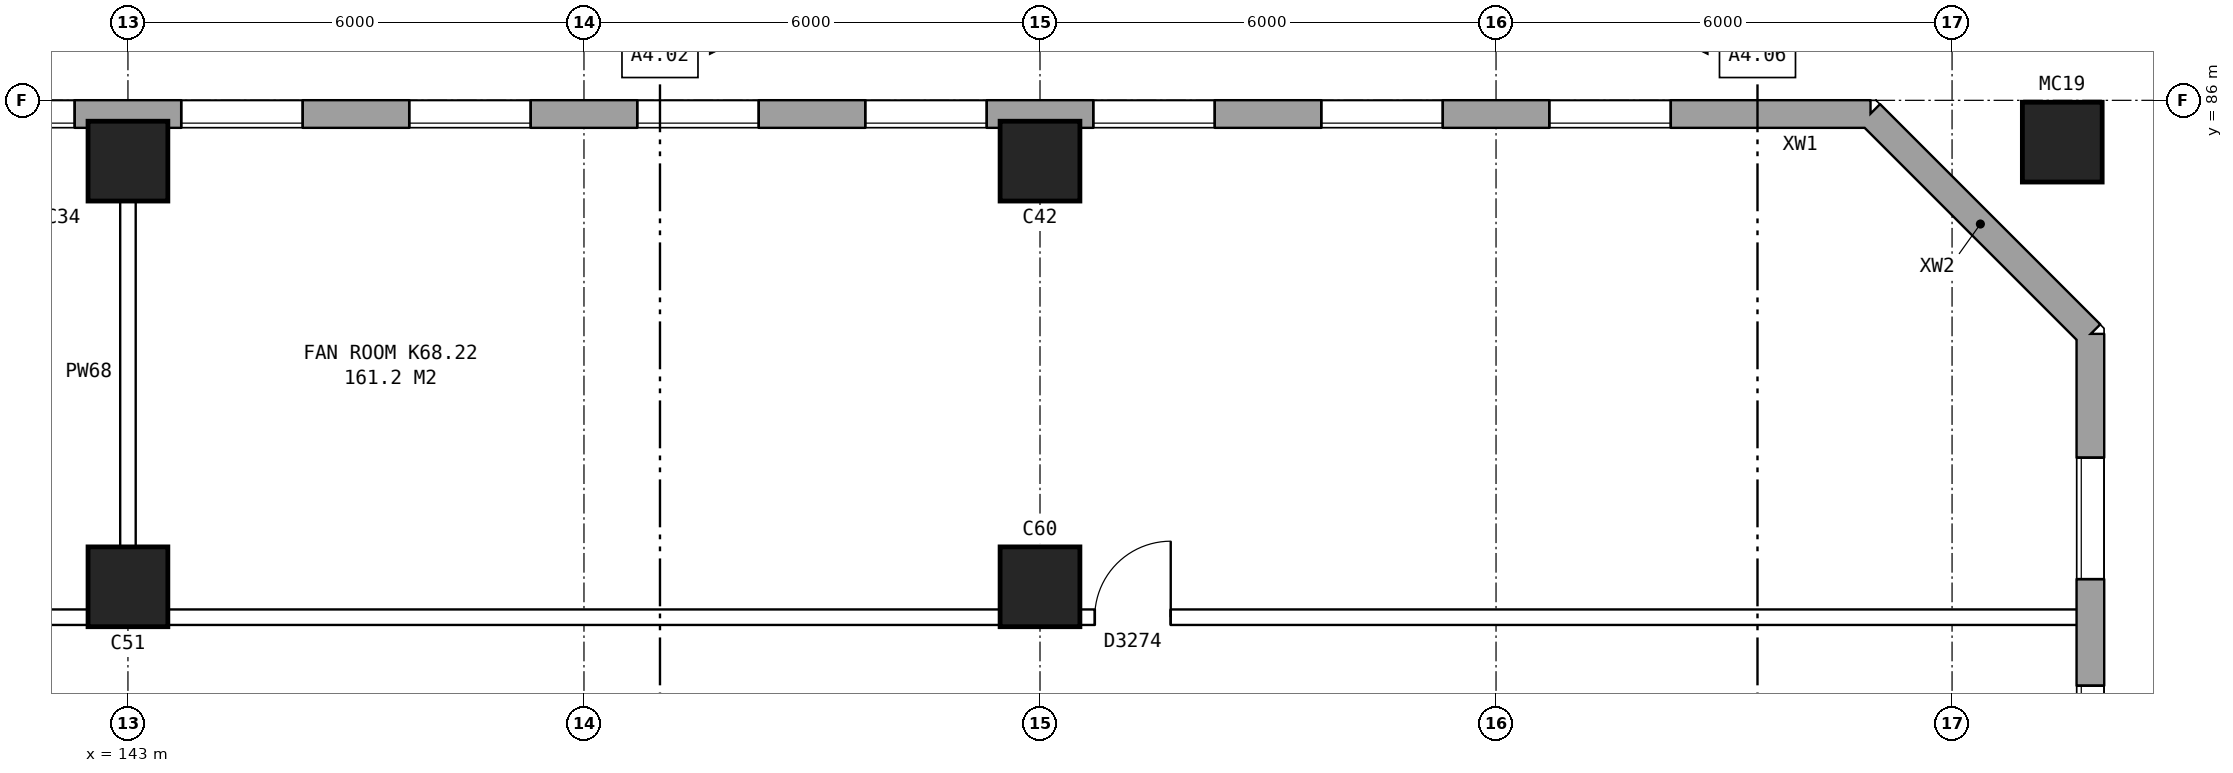
"""IFC4 building model, lengths in metres.
Left out: names, types, materials, properties, quantities, classifications, styles, units other than length and angle.
Written with IfcOpenShell. Run it as: python <this file> out.ifc"""

import sys

from ifc_helpers import new_model, si_unit, direction, frame, frame_2d, origin, origin_2d, place, context, subcontext, project, spatial, polyline, rectangle, hollow_rectangle, outline, extrude, element, fill, save


model = new_model("IFC4")
c1 = context("Model", 3, precision=1e-05, world=origin(), true_north=direction((0.0, 1.0)))
c2 = subcontext(c1, "Body", "Model", "MODEL_VIEW")
j1 = project(units=[si_unit("LENGTHUNIT", "METRE"), si_unit("PLANEANGLEUNIT", "RADIAN")], contexts=[c1])
p1 = place(None, origin())
s1 = spatial("IfcSite", under=j1, at=p1, CompositionType="ELEMENT")
p2 = place(p1, origin())
s2 = spatial("IfcBuilding", under=s1, at=p2, CompositionType="ELEMENT")
p3 = place(p2, frame((0.0, 0.0, 243.9)))
s3 = spatial("IfcBuildingStorey", under=s2, at=p3, CompositionType="ELEMENT", Elevation=243.9)
p4 = place(p3, frame((143.0, 79.6, 0.0), z_axis=(0.0, 0.0, 1.0), x_axis=(1.0, 0.0, 0.0)))
e1 = element("IfcColumn", 1, at=p4, inside=s3, PredefinedType="COLUMN", context=c2, shape_type="SweptSolid", body=[
    extrude(rectangle(XDim=1.05, YDim=1.05, at=origin_2d()), origin(), (0.0, 0.0, 1.0), 15.563),
])
p5 = place(p3, frame((143.0, 85.2, 0.0), z_axis=(0.0, 0.0, 1.0), x_axis=(1.0, 0.0, 0.0)))
e2 = element("IfcColumn", 2, at=p5, inside=s3, PredefinedType="COLUMN", context=c2, shape_type="SweptSolid", body=[
    extrude(rectangle(XDim=1.05, YDim=1.05, at=origin_2d()), origin(), (0.0, 0.0, 1.0), 18.363),
])
p6 = place(p3, frame((155.0, 79.6, 0.0), z_axis=(0.0, 0.0, 1.0), x_axis=(1.0, 0.0, 0.0)))
e3 = element("IfcColumn", 3, at=p6, inside=s3, PredefinedType="COLUMN", context=c2, shape_type="SweptSolid", body=[
    extrude(rectangle(XDim=1.05, YDim=1.05, at=origin_2d()), origin(), (0.0, 0.0, 1.0), 15.563),
])
p7 = place(p3, frame((155.0, 85.2, 0.0), z_axis=(0.0, 0.0, 1.0), x_axis=(1.0, 0.0, 0.0)))
e4 = element("IfcColumn", 4, at=p7, inside=s3, PredefinedType="COLUMN", context=c2, shape_type="SweptSolid", body=[
    extrude(rectangle(XDim=1.05, YDim=1.05, at=origin_2d()), origin(), (0.0, 0.0, 1.0), 18.363),
])
p8 = place(p3, frame((168.45, 85.45, 0.0), z_axis=(0.0, 0.0, 1.0), x_axis=(1.0, 0.0, 0.0)))
e5 = element("IfcColumn", 5, at=p8, inside=s3, PredefinedType="COLUMN", context=c2, shape_type="SweptSolid", body=[
    extrude(hollow_rectangle(XDim=1.05, YDim=1.05, WallThickness=0.053, at=origin_2d()), origin(), (0.0, 0.0, 1.0), 18.488),
])
p9 = place(p3, frame((168.82, 57.075, 0.0), z_axis=(0.0, 0.0, 1.0), x_axis=(0.0, 1.0, 0.0)))
e6 = element("IfcWall", 6, at=p9, inside=s3, PredefinedType="STANDARD", context=c2, shape_type="SweptSolid", body=[
    extrude(outline(polyline([(0.0, 0.0), (25.851, 0.0), (25.851, 17.763), (0.0, 4.837), (0.0, 0.0)])), frame((0.0, 0.18, 0.0), z_axis=(0.0, -1.0, 0.0), x_axis=(1.0, 0.0, 0.0)), (0.0, 0.0, 1.0), 0.36),
])
p10 = place(p9, frame((1.625, 0.0, 1.5)))
e7 = element("IfcOpeningElement", 7, at=p10, cuts=e6, PredefinedType="OPENING", context=c2, shape_type="SweptSolid", body=[
    extrude(rectangle(XDim=1.6, YDim=1.2, at=frame_2d((0.8, 0.6))), frame((0.0, 0.19, 0.0), z_axis=(0.0, -1.0, 0.0), x_axis=(1.0, 0.0, 0.0)), (0.0, 0.0, 1.0), 0.38),
])
p11 = place(p9, frame((4.625, 0.0, 1.5)))
e8 = element("IfcOpeningElement", 8, at=p11, cuts=e6, PredefinedType="OPENING", context=c2, shape_type="SweptSolid", body=[
    extrude(rectangle(XDim=1.6, YDim=1.2, at=frame_2d((0.8, 0.6))), frame((0.0, 0.19, 0.0), z_axis=(0.0, -1.0, 0.0), x_axis=(1.0, 0.0, 0.0)), (0.0, 0.0, 1.0), 0.38),
])
p12 = place(p9, frame((19.625, 0.0, 1.5)))
e9 = element("IfcOpeningElement", 9, at=p12, cuts=e6, PredefinedType="OPENING", context=c2, shape_type="SweptSolid", body=[
    extrude(rectangle(XDim=1.6, YDim=1.2, at=frame_2d((0.8, 0.6))), frame((0.0, 0.19, 0.0), z_axis=(0.0, -1.0, 0.0), x_axis=(1.0, 0.0, 0.0)), (0.0, 0.0, 1.0), 0.38),
])
p13 = place(p9, frame((22.625, 0.0, 1.5)))
e10 = element("IfcOpeningElement", 10, at=p13, cuts=e6, PredefinedType="OPENING", context=c2, shape_type="SweptSolid", body=[
    extrude(rectangle(XDim=1.6, YDim=1.2, at=frame_2d((0.8, 0.6))), frame((0.0, 0.19, 0.0), z_axis=(0.0, -1.0, 0.0), x_axis=(1.0, 0.0, 0.0)), (0.0, 0.0, 1.0), 0.38),
])
p14 = place(p3, frame((168.82, 82.925, 0.0), z_axis=(0.0, 0.0, 1.0), x_axis=(-0.707106781187, 0.707106781187, 0.0)))
e11 = element("IfcWall", 11, at=p14, inside=s3, PredefinedType="STANDARD", context=c2, shape_type="SweptSolid", body=[
    extrude(outline(polyline([(0.0, 0.0), (4.094, 0.0), (4.094, 19.21), (0.0, 17.763), (0.0, 0.0)])), frame((0.0, 0.18, 0.0), z_axis=(0.0, -1.0, 0.0), x_axis=(1.0, 0.0, 0.0)), (0.0, 0.0, 1.0), 0.36),
])
p15 = place(p3, frame((165.925, 85.82, 0.0), z_axis=(0.0, 0.0, 1.0), x_axis=(-1.0, 0.0, 0.0)))
e12 = element("IfcWall", 12, at=p15, inside=s3, PredefinedType="STANDARD", context=c2, shape_type="SweptSolid", body=[
    extrude(rectangle(XDim=33.85, YDim=0.36, at=frame_2d((16.925, 0.0))), origin(), (0.0, 0.0, 1.0), 19.21),
])
p16 = place(p15, frame((29.625, 0.0, 1.5)))
e13 = element("IfcOpeningElement", 13, at=p16, cuts=e12, PredefinedType="OPENING", context=c2, shape_type="SweptSolid", body=[
    extrude(rectangle(XDim=1.6, YDim=1.2, at=frame_2d((0.8, 0.6))), frame((0.0, 0.19, 0.0), z_axis=(0.0, -1.0, 0.0), x_axis=(1.0, 0.0, 0.0)), (0.0, 0.0, 1.0), 0.38),
])
p17 = place(p15, frame((26.625, 0.0, 1.5)))
e14 = element("IfcOpeningElement", 14, at=p17, cuts=e12, PredefinedType="OPENING", context=c2, shape_type="SweptSolid", body=[
    extrude(rectangle(XDim=1.6, YDim=1.2, at=frame_2d((0.8, 0.6))), frame((0.0, 0.19, 0.0), z_axis=(0.0, -1.0, 0.0), x_axis=(1.0, 0.0, 0.0)), (0.0, 0.0, 1.0), 0.38),
])
p18 = place(p15, frame((23.625, 0.0, 1.5)))
e15 = element("IfcOpeningElement", 15, at=p18, cuts=e12, PredefinedType="OPENING", context=c2, shape_type="SweptSolid", body=[
    extrude(rectangle(XDim=1.6, YDim=1.2, at=frame_2d((0.8, 0.6))), frame((0.0, 0.19, 0.0), z_axis=(0.0, -1.0, 0.0), x_axis=(1.0, 0.0, 0.0)), (0.0, 0.0, 1.0), 0.38),
])
p19 = place(p15, frame((20.625, 0.0, 1.5)))
e16 = element("IfcOpeningElement", 16, at=p19, cuts=e12, PredefinedType="OPENING", context=c2, shape_type="SweptSolid", body=[
    extrude(rectangle(XDim=1.6, YDim=1.2, at=frame_2d((0.8, 0.6))), frame((0.0, 0.19, 0.0), z_axis=(0.0, -1.0, 0.0), x_axis=(1.0, 0.0, 0.0)), (0.0, 0.0, 1.0), 0.38),
])
p20 = place(p15, frame((17.625, 0.0, 1.5)))
e17 = element("IfcOpeningElement", 17, at=p20, cuts=e12, PredefinedType="OPENING", context=c2, shape_type="SweptSolid", body=[
    extrude(rectangle(XDim=1.6, YDim=1.2, at=frame_2d((0.8, 0.6))), frame((0.0, 0.19, 0.0), z_axis=(0.0, -1.0, 0.0), x_axis=(1.0, 0.0, 0.0)), (0.0, 0.0, 1.0), 0.38),
])
p21 = place(p15, frame((14.625, 0.0, 1.5)))
e18 = element("IfcOpeningElement", 18, at=p21, cuts=e12, PredefinedType="OPENING", context=c2, shape_type="SweptSolid", body=[
    extrude(rectangle(XDim=1.6, YDim=1.2, at=frame_2d((0.8, 0.6))), frame((0.0, 0.19, 0.0), z_axis=(0.0, -1.0, 0.0), x_axis=(1.0, 0.0, 0.0)), (0.0, 0.0, 1.0), 0.38),
])
p22 = place(p15, frame((11.625, 0.0, 1.5)))
e19 = element("IfcOpeningElement", 19, at=p22, cuts=e12, PredefinedType="OPENING", context=c2, shape_type="SweptSolid", body=[
    extrude(rectangle(XDim=1.6, YDim=1.2, at=frame_2d((0.8, 0.6))), frame((0.0, 0.19, 0.0), z_axis=(0.0, -1.0, 0.0), x_axis=(1.0, 0.0, 0.0)), (0.0, 0.0, 1.0), 0.38),
])
p23 = place(p15, frame((8.625, 0.0, 1.5)))
e20 = element("IfcOpeningElement", 20, at=p23, cuts=e12, PredefinedType="OPENING", context=c2, shape_type="SweptSolid", body=[
    extrude(rectangle(XDim=1.6, YDim=1.2, at=frame_2d((0.8, 0.6))), frame((0.0, 0.19, 0.0), z_axis=(0.0, -1.0, 0.0), x_axis=(1.0, 0.0, 0.0)), (0.0, 0.0, 1.0), 0.38),
])
p24 = place(p15, frame((5.625, 0.0, 1.5)))
e21 = element("IfcOpeningElement", 21, at=p24, cuts=e12, PredefinedType="OPENING", context=c2, shape_type="SweptSolid", body=[
    extrude(rectangle(XDim=1.6, YDim=1.2, at=frame_2d((0.8, 0.6))), frame((0.0, 0.19, 0.0), z_axis=(0.0, -1.0, 0.0), x_axis=(1.0, 0.0, 0.0)), (0.0, 0.0, 1.0), 0.38),
])
p25 = place(p15, frame((2.625, 0.0, 1.5)))
e22 = element("IfcOpeningElement", 22, at=p25, cuts=e12, PredefinedType="OPENING", context=c2, shape_type="SweptSolid", body=[
    extrude(rectangle(XDim=1.6, YDim=1.2, at=frame_2d((0.8, 0.6))), frame((0.0, 0.19, 0.0), z_axis=(0.0, -1.0, 0.0), x_axis=(1.0, 0.0, 0.0)), (0.0, 0.0, 1.0), 0.38),
])
p26 = place(p3, frame((32.24, 79.2, 0.0), z_axis=(0.0, 0.0, 1.0), x_axis=(1.0, 0.0, 0.0)))
e23 = element("IfcWall", 23, at=p26, inside=s3, PredefinedType="PARTITIONING", context=c2, shape_type="SweptSolid", body=[
    extrude(rectangle(XDim=136.52, YDim=0.2, at=frame_2d((68.26, 0.0))), origin(), (0.0, 0.0, 1.0), 3.3),
])
p27 = place(p26, frame((3.44, 0.0, 0.0)))
e24 = element("IfcOpeningElement", 24, at=p27, cuts=e23, PredefinedType="OPENING", context=c2, shape_type="SweptSolid", body=[
    extrude(rectangle(XDim=1.0, YDim=2.1, at=frame_2d((0.5, 1.05))), frame((0.0, 0.11, 0.0), z_axis=(0.0, -1.0, 0.0), x_axis=(1.0, 0.0, 0.0)), (0.0, 0.0, 1.0), 0.22),
])
p28 = place(p26, frame((13.26, 0.0, 0.0)))
e25 = element("IfcOpeningElement", 25, at=p28, cuts=e23, PredefinedType="OPENING", context=c2, shape_type="SweptSolid", body=[
    extrude(rectangle(XDim=1.0, YDim=2.1, at=frame_2d((0.5, 1.05))), frame((0.0, 0.11, 0.0), z_axis=(0.0, -1.0, 0.0), x_axis=(1.0, 0.0, 0.0)), (0.0, 0.0, 1.0), 0.22),
])
p29 = place(p26, frame((25.26, 0.0, 0.0)))
e26 = element("IfcOpeningElement", 26, at=p29, cuts=e23, PredefinedType="OPENING", context=c2, shape_type="SweptSolid", body=[
    extrude(rectangle(XDim=1.0, YDim=2.1, at=frame_2d((0.5, 1.05))), frame((0.0, 0.11, 0.0), z_axis=(0.0, -1.0, 0.0), x_axis=(1.0, 0.0, 0.0)), (0.0, 0.0, 1.0), 0.22),
])
p30 = place(p26, frame((37.08, 0.0, 0.0)))
e27 = element("IfcOpeningElement", 27, at=p30, cuts=e23, PredefinedType="OPENING", context=c2, shape_type="SweptSolid", body=[
    extrude(rectangle(XDim=1.0, YDim=2.1, at=frame_2d((0.5, 1.05))), frame((0.0, 0.11, 0.0), z_axis=(0.0, -1.0, 0.0), x_axis=(1.0, 0.0, 0.0)), (0.0, 0.0, 1.0), 0.22),
])
p31 = place(p26, frame((49.955, 0.0, 0.0)))
e28 = element("IfcOpeningElement", 28, at=p31, cuts=e23, PredefinedType="OPENING", context=c2, shape_type="SweptSolid", body=[
    extrude(rectangle(XDim=1.0, YDim=2.1, at=frame_2d((0.5, 1.05))), frame((0.0, 0.11, 0.0), z_axis=(0.0, -1.0, 0.0), x_axis=(1.0, 0.0, 0.0)), (0.0, 0.0, 1.0), 0.22),
])
p32 = place(p26, frame((67.322, 0.0, 0.0)))
e29 = element("IfcOpeningElement", 29, at=p32, cuts=e23, PredefinedType="OPENING", context=c2, shape_type="SweptSolid", body=[
    extrude(rectangle(XDim=1.0, YDim=2.1, at=frame_2d((0.5, 1.05))), frame((0.0, 0.11, 0.0), z_axis=(0.0, -1.0, 0.0), x_axis=(1.0, 0.0, 0.0)), (0.0, 0.0, 1.0), 0.22),
])
p33 = place(p26, frame((84.51, 0.0, 0.0)))
e30 = element("IfcOpeningElement", 30, at=p33, cuts=e23, PredefinedType="OPENING", context=c2, shape_type="SweptSolid", body=[
    extrude(rectangle(XDim=1.0, YDim=2.1, at=frame_2d((0.5, 1.05))), frame((0.0, 0.11, 0.0), z_axis=(0.0, -1.0, 0.0), x_axis=(1.0, 0.0, 0.0)), (0.0, 0.0, 1.0), 0.22),
])
p34 = place(p26, frame((95.003, 0.0, 0.0)))
e31 = element("IfcOpeningElement", 31, at=p34, cuts=e23, PredefinedType="OPENING", context=c2, shape_type="SweptSolid", body=[
    extrude(rectangle(XDim=1.0, YDim=2.1, at=frame_2d((0.5, 1.05))), frame((0.0, 0.11, 0.0), z_axis=(0.0, -1.0, 0.0), x_axis=(1.0, 0.0, 0.0)), (0.0, 0.0, 1.0), 0.22),
])
p35 = place(p26, frame((104.44, 0.0, 0.0)))
e32 = element("IfcOpeningElement", 32, at=p35, cuts=e23, PredefinedType="OPENING", context=c2, shape_type="SweptSolid", body=[
    extrude(rectangle(XDim=1.0, YDim=2.1, at=frame_2d((0.5, 1.05))), frame((0.0, 0.11, 0.0), z_axis=(0.0, -1.0, 0.0), x_axis=(1.0, 0.0, 0.0)), (0.0, 0.0, 1.0), 0.22),
])
p36 = place(p26, frame((123.48, 0.0, 0.0)))
e33 = element("IfcOpeningElement", 33, at=p36, cuts=e23, PredefinedType="OPENING", context=c2, shape_type="SweptSolid", body=[
    extrude(rectangle(XDim=1.0, YDim=2.1, at=frame_2d((0.5, 1.05))), frame((0.0, 0.11, 0.0), z_axis=(0.0, -1.0, 0.0), x_axis=(1.0, 0.0, 0.0)), (0.0, 0.0, 1.0), 0.22),
])
p37 = place(p3, frame((143.0, 79.1, 0.0), z_axis=(0.0, 0.0, 1.0), x_axis=(0.0, 1.0, 0.0)))
e34 = element("IfcWall", 34, at=p37, inside=s3, PredefinedType="PARTITIONING", context=c2, shape_type="SweptSolid", body=[
    extrude(rectangle(XDim=6.66, YDim=0.2, at=frame_2d((3.33, 0.0))), origin(), (0.0, 0.0, 1.0), 3.3),
])
p38 = place(p12, origin())
e35 = element("IfcWindow", 35, at=p38, inside=s3, PartitioningType="DOUBLE_PANEL_HORIZONTAL", PredefinedType="WINDOW", context=c2, shape_type="SweptSolid", body=[
    extrude(rectangle(XDim=1.6, YDim=1.2, at=frame_2d((0.8, 0.6))), frame((0.0, 0.15, 0.0), z_axis=(0.0, -1.0, 0.0), x_axis=(1.0, 0.0, 0.0)), (0.0, 0.0, 1.0), 0.06),
])
fill(e9, e35)
p39 = place(p13, origin())
e36 = element("IfcWindow", 36, at=p39, inside=s3, PartitioningType="DOUBLE_PANEL_HORIZONTAL", PredefinedType="WINDOW", context=c2, shape_type="SweptSolid", body=[
    extrude(rectangle(XDim=1.6, YDim=1.2, at=frame_2d((0.8, 0.6))), frame((0.0, 0.15, 0.0), z_axis=(0.0, -1.0, 0.0), x_axis=(1.0, 0.0, 0.0)), (0.0, 0.0, 1.0), 0.06),
])
fill(e10, e36)
p40 = place(p18, origin())
e37 = element("IfcWindow", 37, at=p40, inside=s3, PartitioningType="DOUBLE_PANEL_HORIZONTAL", PredefinedType="WINDOW", context=c2, shape_type="SweptSolid", body=[
    extrude(rectangle(XDim=1.6, YDim=1.2, at=frame_2d((0.8, 0.6))), frame((0.0, 0.15, 0.0), z_axis=(0.0, -1.0, 0.0), x_axis=(1.0, 0.0, 0.0)), (0.0, 0.0, 1.0), 0.06),
])
fill(e15, e37)
p41 = place(p19, origin())
e38 = element("IfcWindow", 38, at=p41, inside=s3, PartitioningType="DOUBLE_PANEL_HORIZONTAL", PredefinedType="WINDOW", context=c2, shape_type="SweptSolid", body=[
    extrude(rectangle(XDim=1.6, YDim=1.2, at=frame_2d((0.8, 0.6))), frame((0.0, 0.15, 0.0), z_axis=(0.0, -1.0, 0.0), x_axis=(1.0, 0.0, 0.0)), (0.0, 0.0, 1.0), 0.06),
])
fill(e16, e38)
p42 = place(p20, origin())
e39 = element("IfcWindow", 39, at=p42, inside=s3, PartitioningType="DOUBLE_PANEL_HORIZONTAL", PredefinedType="WINDOW", context=c2, shape_type="SweptSolid", body=[
    extrude(rectangle(XDim=1.6, YDim=1.2, at=frame_2d((0.8, 0.6))), frame((0.0, 0.15, 0.0), z_axis=(0.0, -1.0, 0.0), x_axis=(1.0, 0.0, 0.0)), (0.0, 0.0, 1.0), 0.06),
])
fill(e17, e39)
p43 = place(p21, origin())
e40 = element("IfcWindow", 40, at=p43, inside=s3, PartitioningType="DOUBLE_PANEL_HORIZONTAL", PredefinedType="WINDOW", context=c2, shape_type="SweptSolid", body=[
    extrude(rectangle(XDim=1.6, YDim=1.2, at=frame_2d((0.8, 0.6))), frame((0.0, 0.15, 0.0), z_axis=(0.0, -1.0, 0.0), x_axis=(1.0, 0.0, 0.0)), (0.0, 0.0, 1.0), 0.06),
])
fill(e18, e40)
p44 = place(p22, origin())
e41 = element("IfcWindow", 41, at=p44, inside=s3, PartitioningType="DOUBLE_PANEL_HORIZONTAL", PredefinedType="WINDOW", context=c2, shape_type="SweptSolid", body=[
    extrude(rectangle(XDim=1.6, YDim=1.2, at=frame_2d((0.8, 0.6))), frame((0.0, 0.15, 0.0), z_axis=(0.0, -1.0, 0.0), x_axis=(1.0, 0.0, 0.0)), (0.0, 0.0, 1.0), 0.06),
])
fill(e19, e41)
p45 = place(p23, origin())
e42 = element("IfcWindow", 42, at=p45, inside=s3, PartitioningType="DOUBLE_PANEL_HORIZONTAL", PredefinedType="WINDOW", context=c2, shape_type="SweptSolid", body=[
    extrude(rectangle(XDim=1.6, YDim=1.2, at=frame_2d((0.8, 0.6))), frame((0.0, 0.15, 0.0), z_axis=(0.0, -1.0, 0.0), x_axis=(1.0, 0.0, 0.0)), (0.0, 0.0, 1.0), 0.06),
])
fill(e20, e42)
p46 = place(p24, origin())
e43 = element("IfcWindow", 43, at=p46, inside=s3, PartitioningType="DOUBLE_PANEL_HORIZONTAL", PredefinedType="WINDOW", context=c2, shape_type="SweptSolid", body=[
    extrude(rectangle(XDim=1.6, YDim=1.2, at=frame_2d((0.8, 0.6))), frame((0.0, 0.15, 0.0), z_axis=(0.0, -1.0, 0.0), x_axis=(1.0, 0.0, 0.0)), (0.0, 0.0, 1.0), 0.06),
])
fill(e21, e43)
p47 = place(p25, origin())
e44 = element("IfcWindow", 44, at=p47, inside=s3, PartitioningType="DOUBLE_PANEL_HORIZONTAL", PredefinedType="WINDOW", context=c2, shape_type="SweptSolid", body=[
    extrude(rectangle(XDim=1.6, YDim=1.2, at=frame_2d((0.8, 0.6))), frame((0.0, 0.15, 0.0), z_axis=(0.0, -1.0, 0.0), x_axis=(1.0, 0.0, 0.0)), (0.0, 0.0, 1.0), 0.06),
])
fill(e22, e44)
p48 = place(p36, origin())
e45 = element("IfcDoor", 45, at=p48, inside=s3, OperationType="SINGLE_SWING_RIGHT", PredefinedType="DOOR", context=c2, shape_type="SweptSolid", body=[
    extrude(rectangle(XDim=1.0, YDim=2.1, at=frame_2d((0.5, 1.05))), frame((0.0, 0.025, 0.0), z_axis=(0.0, -1.0, 0.0), x_axis=(1.0, 0.0, 0.0)), (0.0, 0.0, 1.0), 0.05),
])
fill(e33, e45)
save(model, sys.argv[1])
